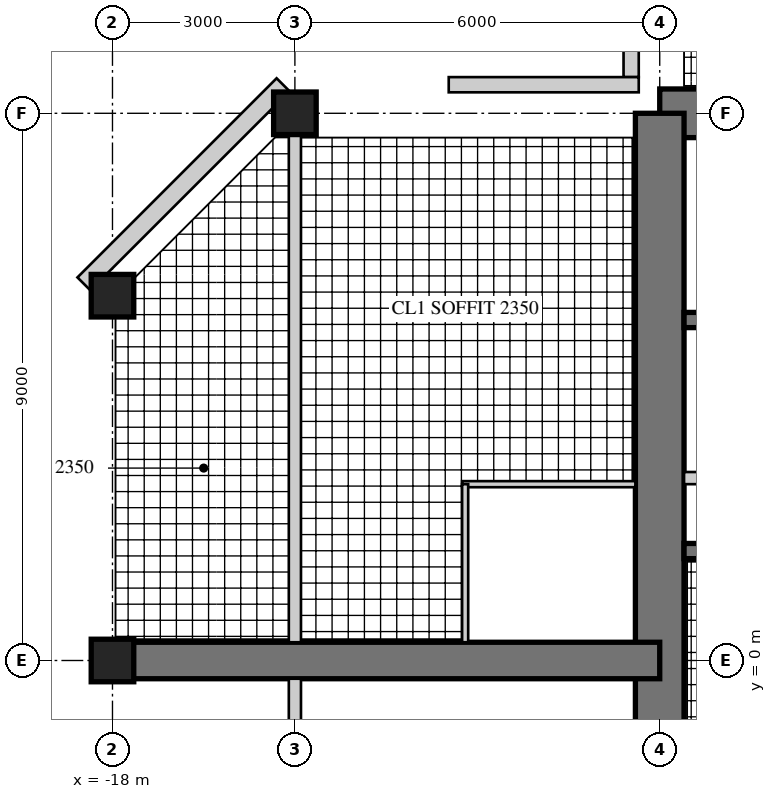
"""IFC4 building model, lengths in metres.
Left out: names, types, materials, properties, quantities, classifications, styles, units other than length and angle.
Written with IfcOpenShell. Run it as: python <this file> out.ifc"""

import sys

from ifc_helpers import new_model, si_unit, direction, frame, frame_2d, origin, origin_2d, place, context, subcontext, project, spatial, rectangle, hollow_rectangle, extrude, element, fill, save


model = new_model("IFC4")
c1 = context("Model", 3, precision=1e-05, world=origin(), true_north=direction((0.0, 1.0)))
c2 = subcontext(c1, "Body", "Model", "MODEL_VIEW")
j1 = project(units=[si_unit("LENGTHUNIT", "METRE"), si_unit("PLANEANGLEUNIT", "RADIAN")], contexts=[c1])
p1 = place(None, origin())
s1 = spatial("IfcSite", under=j1, at=p1, CompositionType="ELEMENT")
p2 = place(p1, origin())
s2 = spatial("IfcBuilding", under=s1, at=p2, CompositionType="ELEMENT")
p3 = place(p2, frame((0.0, 0.0, 278.1)))
s3 = spatial("IfcBuildingStorey", under=s2, at=p3, CompositionType="ELEMENT", Elevation=278.1)
p4 = place(p3, frame((9.0, 9.0, 0.0), z_axis=(0.0, 0.0, 1.0), x_axis=(-1.0, 0.0, 0.0)))
e1 = element("IfcWall", 1, at=p4, inside=s3, PredefinedType="SHEAR", context=c2, shape_type="SweptSolid", body=[
    extrude(rectangle(XDim=18.0, YDim=0.8, at=frame_2d((9.0, 0.0))), origin(), (0.0, 0.0, 1.0), 3.4),
])
p5 = place(p4, frame((9.8, 0.0, 0.0)))
e2 = element("IfcOpeningElement", 2, at=p5, cuts=e1, PredefinedType="OPENING", context=c2, shape_type="SweptSolid", body=[
    extrude(rectangle(XDim=1.0, YDim=2.4, at=frame_2d((0.5, 1.2))), frame((0.0, 0.41, 0.0), z_axis=(0.0, -1.0, 0.0), x_axis=(1.0, 0.0, 0.0)), (0.0, 0.0, 1.0), 0.82),
])
p6 = place(p3, frame((-9.0, 9.0, 0.0), z_axis=(0.0, 0.0, 1.0), x_axis=(0.0, -1.0, 0.0)))
e3 = element("IfcWall", 3, at=p6, inside=s3, PredefinedType="SHEAR", context=c2, shape_type="SweptSolid", body=[
    extrude(rectangle(XDim=18.0, YDim=0.8, at=frame_2d((9.0, 0.0))), origin(), (0.0, 0.0, 1.0), 3.4),
])
p7 = place(p6, frame((9.8, 0.0, 0.0)))
e4 = element("IfcOpeningElement", 4, at=p7, cuts=e3, PredefinedType="OPENING", context=c2, shape_type="SweptSolid", body=[
    extrude(rectangle(XDim=1.0, YDim=2.4, at=frame_2d((0.5, 1.2))), frame((0.0, 0.41, 0.0), z_axis=(0.0, -1.0, 0.0), x_axis=(1.0, 0.0, 0.0)), (0.0, 0.0, 1.0), 0.82),
])
p8 = place(p3, frame((-2.125, 1.8, 0.0), z_axis=(0.0, 0.0, 1.0), x_axis=(-1.0, 0.0, 0.0)))
e5 = element("IfcWall", 5, at=p8, inside=s3, PredefinedType="SHEAR", context=c2, shape_type="SweptSolid", body=[
    extrude(rectangle(XDim=6.475, YDim=0.25, at=frame_2d((3.238, 0.0))), origin(), (0.0, 0.0, 1.0), 3.4),
])
p9 = place(p3, frame((-2.125, 5.6, 0.0), z_axis=(0.0, 0.0, 1.0), x_axis=(-1.0, 0.0, 0.0)))
e6 = element("IfcWall", 6, at=p9, inside=s3, PredefinedType="SHEAR", context=c2, shape_type="SweptSolid", body=[
    extrude(rectangle(XDim=6.475, YDim=0.25, at=frame_2d((3.238, 0.0))), origin(), (0.0, 0.0, 1.0), 3.4),
])
p10 = place(p9, frame((0.175, 0.0, 0.0)))
e7 = element("IfcOpeningElement", 7, at=p10, cuts=e6, PredefinedType="OPENING", context=c2, shape_type="SweptSolid", body=[
    extrude(rectangle(XDim=1.0, YDim=2.1, at=frame_2d((0.5, 1.05))), frame((0.0, 0.135, 0.0), z_axis=(0.0, -1.0, 0.0), x_axis=(1.0, 0.0, 0.0)), (0.0, 0.0, 1.0), 0.27),
])
p11 = place(p3, frame((-5.725, 3.0, 0.0), z_axis=(0.0, 0.0, 1.0), x_axis=(-1.0, 0.0, 0.0)))
e8 = element("IfcWall", 8, at=p11, inside=s3, PredefinedType="PARTITIONING", context=c2, shape_type="SweptSolid", body=[
    extrude(rectangle(XDim=2.875, YDim=0.2, at=frame_2d((1.438, 0.0))), origin(), (0.0, 0.0, 1.0), 3.4),
])
p12 = place(p3, frame((-9.0, 0.0, 0.0), z_axis=(0.0, 0.0, 1.0), x_axis=(-1.0, 0.0, 0.0)))
e9 = element("IfcWall", 9, at=p12, inside=s3, PredefinedType="SHEAR", context=c2, shape_type="SweptSolid", body=[
    extrude(rectangle(XDim=9.0, YDim=0.6, at=frame_2d((4.5, 0.0))), origin(), (0.0, 0.0, 1.0), 3.4),
])
p13 = place(p12, frame((3.8, 0.0, 0.0)))
e10 = element("IfcOpeningElement", 10, at=p13, cuts=e9, PredefinedType="OPENING", context=c2, shape_type="SweptSolid", body=[
    extrude(rectangle(XDim=1.0, YDim=2.15, at=frame_2d((0.5, 1.075))), frame((0.0, 0.31, 0.0), z_axis=(0.0, -1.0, 0.0), x_axis=(1.0, 0.0, 0.0)), (0.0, 0.0, 1.0), 0.62),
])
p14 = place(p12, frame((7.0, 0.0, 0.0)))
e11 = element("IfcOpeningElement", 11, at=p14, cuts=e9, PredefinedType="OPENING", context=c2, shape_type="SweptSolid", body=[
    extrude(rectangle(XDim=1.0, YDim=2.2, at=frame_2d((0.5, 1.1))), frame((0.0, 0.31, 0.0), z_axis=(0.0, -1.0, 0.0), x_axis=(1.0, 0.0, 0.0)), (0.0, 0.0, 1.0), 0.62),
])
for number, where, z_axis, x_axis in (
    (12, (-15.0, 9.0, 0.0), (0.0, 0.0, 1.0), (1.0, 0.0, 0.0)),
    (13, (-18.0, 6.0, 0.0), (0.0, 0.0, 1.0), (1.0, 0.0, 0.0)),
    (14, (-18.0, 0.0, 0.0), (0.0, 0.0, 1.0), (1.0, 0.0, 0.0)),
):
    element("IfcColumn", number, at=place(p3, frame(where, z_axis=z_axis, x_axis=x_axis)), inside=s3, PredefinedType="COLUMN", context=c2, shape_type="SweptSolid", body=[
        extrude(rectangle(XDim=0.7, YDim=0.7, at=origin_2d()), origin(), (0.0, 0.0, 1.0), 3.4),
    ])
p15 = place(p3, frame((-9.47, 12.47, 0.0), z_axis=(0.0, 0.0, 1.0), x_axis=(0.0, -1.0, 0.0)))
e15 = element("IfcWall", 15, at=p15, inside=s3, PredefinedType="SOLIDWALL", context=c2, shape_type="SweptSolid", body=[
    extrude(rectangle(XDim=2.875, YDim=0.25, at=frame_2d((1.438, 0.0))), origin(), (0.0, 0.0, 1.0), 3.22),
])
p16 = place(p15, frame((0.6, 0.0, 0.0)))
e16 = element("IfcOpeningElement", 16, at=p16, cuts=e15, PredefinedType="OPENING", context=c2, shape_type="SweptSolid", body=[
    extrude(rectangle(XDim=1.0, YDim=2.2, at=frame_2d((0.5, 1.1))), frame((0.0, 0.135, 0.0), z_axis=(0.0, -1.0, 0.0), x_axis=(1.0, 0.0, 0.0)), (0.0, 0.0, 1.0), 0.27),
])
p17 = place(p3, frame((-9.345, 9.47, 0.0), z_axis=(0.0, 0.0, 1.0), x_axis=(-1.0, 0.0, 0.0)))
e17 = element("IfcWall", 17, at=p17, inside=s3, PredefinedType="SOLIDWALL", context=c2, shape_type="SweptSolid", body=[
    extrude(rectangle(XDim=3.125, YDim=0.25, at=frame_2d((1.562, 0.0))), origin(), (0.0, 0.0, 1.0), 3.22),
])
p18 = place(p17, frame((0.6, 0.0, 0.0)))
e18 = element("IfcOpeningElement", 18, at=p18, cuts=e17, PredefinedType="OPENING", context=c2, shape_type="SweptSolid", body=[
    extrude(rectangle(XDim=1.0, YDim=2.2, at=frame_2d((0.5, 1.1))), frame((0.0, 0.135, 0.0), z_axis=(0.0, -1.0, 0.0), x_axis=(1.0, 0.0, 0.0)), (0.0, 0.0, 1.0), 0.27),
])
p19 = place(p3, frame((-15.195, 9.47, 0.0), z_axis=(0.0, 0.0, 1.0), x_axis=(-0.707106781187, -0.707106781187, 0.0)))
e19 = element("IfcWall", 19, at=p19, inside=s3, PredefinedType="SOLIDWALL", context=c2, shape_type="SweptSolid", body=[
    extrude(rectangle(XDim=4.632, YDim=0.3, at=frame_2d((2.316, 0.0))), origin(), (0.0, 0.0, 1.0), 3.22),
])
p20 = place(p19, frame((1.866, 0.0, 0.3)))
e20 = element("IfcOpeningElement", 20, at=p20, cuts=e19, PredefinedType="OPENING", context=c2, shape_type="SweptSolid", body=[
    extrude(rectangle(XDim=0.9, YDim=2.4, at=frame_2d((0.45, 1.2))), frame((0.0, 0.16, 0.0), z_axis=(0.0, -1.0, 0.0), x_axis=(1.0, 0.0, 0.0)), (0.0, 0.0, 1.0), 0.32),
])
p21 = place(p3, frame((-9.4, 2.9, 0.0), z_axis=(0.0, 0.0, 1.0), x_axis=(-1.0, 0.0, 0.0)))
e21 = element("IfcWall", 21, at=p21, inside=s3, PredefinedType="PARTITIONING", context=c2, shape_type="SweptSolid", body=[
    extrude(rectangle(XDim=2.85, YDim=0.1, at=frame_2d((1.425, 0.0))), origin(), (0.0, 0.0, 1.0), 3.22),
])
p22 = place(p3, frame((-12.2, 2.9, 0.0), z_axis=(0.0, 0.0, 1.0), x_axis=(0.0, -1.0, 0.0)))
e22 = element("IfcWall", 22, at=p22, inside=s3, PredefinedType="PARTITIONING", context=c2, shape_type="SweptSolid", body=[
    extrude(rectangle(XDim=2.6, YDim=0.1, at=frame_2d((1.3, 0.0))), origin(), (0.0, 0.0, 1.0), 3.22),
])
p23 = place(p22, frame((0.55, 0.0, 0.0)))
e23 = element("IfcOpeningElement", 23, at=p23, cuts=e22, PredefinedType="OPENING", context=c2, shape_type="SweptSolid", body=[
    extrude(rectangle(XDim=0.9, YDim=2.1, at=frame_2d((0.45, 1.05))), frame((0.0, 0.06, 0.0), z_axis=(0.0, -1.0, 0.0), x_axis=(1.0, 0.0, 0.0)), (0.0, 0.0, 1.0), 0.12),
])
p24 = place(p3, frame((-15.0, 8.65, 0.0), z_axis=(0.0, 0.0, 1.0), x_axis=(0.0, -1.0, 0.0)))
e24 = element("IfcWall", 24, at=p24, inside=s3, PredefinedType="SOLIDWALL", context=c2, shape_type="SweptSolid", body=[
    extrude(rectangle(XDim=8.35, YDim=0.2, at=frame_2d((4.175, 0.0))), origin(), (0.0, 0.0, 1.0), 2.52),
])
p25 = place(p3, frame((-15.0, -0.3, 0.0), z_axis=(0.0, 0.0, 1.0), x_axis=(0.0, -1.0, 0.0)))
e25 = element("IfcWall", 25, at=p25, inside=s3, PredefinedType="SOLIDWALL", context=c2, shape_type="SweptSolid", body=[
    extrude(rectangle(XDim=8.35, YDim=0.2, at=frame_2d((4.175, 0.0))), origin(), (0.0, 0.0, 1.0), 2.52),
])
p26 = place(p25, frame((0.4, 0.0, 0.0)))
e26 = element("IfcOpeningElement", 26, at=p26, cuts=e25, PredefinedType="OPENING", context=c2, shape_type="SweptSolid", body=[
    extrude(rectangle(XDim=1.0, YDim=2.2, at=frame_2d((0.5, 1.1))), frame((0.0, 0.11, 0.0), z_axis=(0.0, -1.0, 0.0), x_axis=(1.0, 0.0, 0.0)), (0.0, 0.0, 1.0), 0.22),
])
p27 = place(p18, origin())
e27 = element("IfcDoor", 27, at=p27, inside=s3, OperationType="SINGLE_SWING_LEFT", PredefinedType="DOOR", context=c2, shape_type="SweptSolid", body=[
    extrude(hollow_rectangle(XDim=1.0, YDim=2.2, WallThickness=0.06, at=frame_2d((0.5, 1.1))), frame((0.0, 0.025, 0.0), z_axis=(0.0, -1.0, 0.0), x_axis=(1.0, 0.0, 0.0)), (0.0, 0.0, 1.0), 0.05),
    extrude(rectangle(XDim=0.879, YDim=2.079, at=frame_2d((0.5, 1.1))), frame((0.0, 0.025, 0.0), z_axis=(0.0, -1.0, 0.0), x_axis=(1.0, 0.0, 0.0)), (0.0, 0.0, 1.0), 0.05),
])
fill(e18, e27)
p28 = place(p20, origin())
e28 = element("IfcWindow", 28, at=p28, inside=s3, PartitioningType="SINGLE_PANEL", PredefinedType="WINDOW", context=c2, shape_type="SweptSolid", body=[
    extrude(hollow_rectangle(XDim=0.9, YDim=2.4, WallThickness=0.06, at=frame_2d((0.45, 1.2))), frame((0.0, 0.03, 0.0), z_axis=(0.0, -1.0, 0.0), x_axis=(1.0, 0.0, 0.0)), (0.0, 0.0, 1.0), 0.06),
    extrude(rectangle(XDim=0.779, YDim=2.279, at=frame_2d((0.45, 1.2))), frame((0.0, 0.03, 0.0), z_axis=(0.0, -1.0, 0.0), x_axis=(1.0, 0.0, 0.0)), (0.0, 0.0, 1.0), 0.06),
])
fill(e20, e28)
p29 = place(p23, origin())
e29 = element("IfcDoor", 29, at=p29, inside=s3, OperationType="SINGLE_SWING_LEFT", PredefinedType="DOOR", context=c2, shape_type="SweptSolid", body=[
    extrude(rectangle(XDim=0.9, YDim=2.1, at=frame_2d((0.45, 1.05))), frame((0.0, 0.025, 0.0), z_axis=(0.0, -1.0, 0.0), x_axis=(1.0, 0.0, 0.0)), (0.0, 0.0, 1.0), 0.05),
])
fill(e23, e29)
p30 = place(p26, frame((1.0, 0.0, 0.0), z_axis=(0.0, 0.0, 1.0), x_axis=(-1.0, 0.0, 0.0)))
e30 = element("IfcDoor", 30, at=p30, inside=s3, OperationType="SINGLE_SWING_LEFT", PredefinedType="DOOR", context=c2, shape_type="SweptSolid", body=[
    extrude(rectangle(XDim=1.0, YDim=2.2, at=frame_2d((0.5, 1.1))), frame((0.0, 0.025, 0.0), z_axis=(0.0, -1.0, 0.0), x_axis=(1.0, 0.0, 0.0)), (0.0, 0.0, 1.0), 0.05),
])
fill(e26, e30)
p31 = place(p13, frame((1.0, 0.0, 0.0), z_axis=(0.0, 0.0, 1.0), x_axis=(-1.0, 0.0, 0.0)))
e31 = element("IfcDoor", 31, at=p31, inside=s3, OperationType="SINGLE_SWING_RIGHT", PredefinedType="DOOR", context=c2, shape_type="SweptSolid", body=[
    extrude(rectangle(XDim=1.0, YDim=2.15, at=frame_2d((0.5, 1.075))), frame((0.0, 0.025, 0.0), z_axis=(0.0, -1.0, 0.0), x_axis=(1.0, 0.0, 0.0)), (0.0, 0.0, 1.0), 0.05),
])
fill(e10, e31)
p32 = place(p14, origin())
e32 = element("IfcDoor", 32, at=p32, inside=s3, OperationType="SINGLE_SWING_LEFT", PredefinedType="DOOR", context=c2, shape_type="SweptSolid", body=[
    extrude(rectangle(XDim=1.0, YDim=2.2, at=frame_2d((0.5, 1.1))), frame((0.0, 0.025, 0.0), z_axis=(0.0, -1.0, 0.0), x_axis=(1.0, 0.0, 0.0)), (0.0, 0.0, 1.0), 0.05),
])
fill(e11, e32)
p33 = place(p7, origin())
e33 = element("IfcDoor", 33, at=p33, inside=s3, OperationType="SINGLE_SWING_RIGHT", PredefinedType="DOOR", context=c2, shape_type="SweptSolid", body=[
    extrude(rectangle(XDim=1.0, YDim=2.4, at=frame_2d((0.5, 1.2))), frame((0.0, 0.055, 0.0), z_axis=(0.0, -1.0, 0.0), x_axis=(1.0, 0.0, 0.0)), (0.0, 0.0, 1.0), 0.05),
])
fill(e4, e33)
save(model, sys.argv[1])
